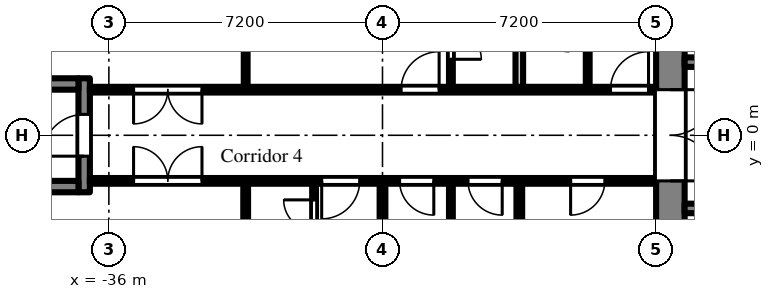
"""IFC4 building model, lengths in metres.
Left out: names, types, materials, properties, quantities, classifications, styles, units other than length and angle.
Written with IfcOpenShell. Run it as: python <this file> out.ifc"""

import sys

from ifc_helpers import new_model, si_unit, direction, frame, frame_2d, origin, place, context, subcontext, project, spatial, rectangle, extrude, element, fill, save


model = new_model("IFC4")
c1 = context("Model", 3, precision=1e-05, world=origin(), true_north=direction((0.0, 1.0)))
c2 = subcontext(c1, "Body", "Model", "MODEL_VIEW")
j1 = project(units=[si_unit("LENGTHUNIT", "METRE"), si_unit("PLANEANGLEUNIT", "RADIAN")], contexts=[c1])
p1 = place(None, origin())
s1 = spatial("IfcSite", under=j1, at=p1, CompositionType="ELEMENT")
p2 = place(p1, origin())
s2 = spatial("IfcBuilding", under=s1, at=p2, CompositionType="ELEMENT")
p3 = place(p2, frame((0.0, 0.0, 69.9)))
s3 = spatial("IfcBuildingStorey", under=s2, at=p3, CompositionType="ELEMENT", Elevation=69.9)
p4 = place(p3, frame((-21.225, -7.2, 0.0), z_axis=(0.0, 0.0, 1.0), x_axis=(0.0, 1.0, 0.0)))
e1 = element("IfcWall", 1, at=p4, inside=s3, PredefinedType="SHEAR", context=c2, shape_type="SweptSolid", body=[
    extrude(rectangle(XDim=14.4, YDim=0.75, at=frame_2d((7.2, 0.0))), origin(), (0.0, 0.0, 1.0), 2.575),
])
p5 = place(p4, frame((6.0, 0.0, 0.0)))
e2 = element("IfcOpeningElement", 2, at=p5, cuts=e1, PredefinedType="OPENING", context=c2, shape_type="SweptSolid", body=[
    extrude(rectangle(XDim=2.4, YDim=2.2, at=frame_2d((1.2, 1.1))), frame((0.0, 0.385, 0.0), z_axis=(0.0, -1.0, 0.0), x_axis=(1.0, 0.0, 0.0)), (0.0, 0.0, 1.0), 0.77),
])
p6 = place(p3, frame((-7.9, 1.925, 0.0), z_axis=(0.0, 0.0, 1.0), x_axis=(-1.0, 0.0, 0.0)))
e3 = element("IfcWall", 3, at=p6, inside=s3, PredefinedType="SHEAR", context=c2, shape_type="SweptSolid", body=[
    extrude(rectangle(XDim=12.95, YDim=0.25, at=frame_2d((6.475, 0.0))), origin(), (0.0, 0.0, 1.0), 2.575),
])
p7 = place(p6, frame((0.525, 0.0, 0.0)))
e4 = element("IfcOpeningElement", 4, at=p7, cuts=e3, PredefinedType="OPENING", context=c2, shape_type="SweptSolid", body=[
    extrude(rectangle(XDim=0.9, YDim=2.1, at=frame_2d((0.45, 1.05))), frame((0.0, 0.135, 0.0), z_axis=(0.0, -1.0, 0.0), x_axis=(1.0, 0.0, 0.0)), (0.0, 0.0, 1.0), 0.27),
])
p8 = place(p6, frame((2.625, 0.0, 0.0)))
e5 = element("IfcOpeningElement", 5, at=p8, cuts=e3, PredefinedType="OPENING", context=c2, shape_type="SweptSolid", body=[
    extrude(rectangle(XDim=1.1, YDim=2.1, at=frame_2d((0.55, 1.05))), frame((0.0, 0.135, 0.0), z_axis=(0.0, -1.0, 0.0), x_axis=(1.0, 0.0, 0.0)), (0.0, 0.0, 1.0), 0.27),
])
p9 = place(p6, frame((7.125, 0.0, 0.0)))
e6 = element("IfcOpeningElement", 6, at=p9, cuts=e3, PredefinedType="OPENING", context=c2, shape_type="SweptSolid", body=[
    extrude(rectangle(XDim=0.9, YDim=2.1, at=frame_2d((0.45, 1.05))), frame((0.0, 0.135, 0.0), z_axis=(0.0, -1.0, 0.0), x_axis=(1.0, 0.0, 0.0)), (0.0, 0.0, 1.0), 0.27),
])
p10 = place(p3, frame((-7.9, -1.925, 0.0), z_axis=(0.0, 0.0, 1.0), x_axis=(-1.0, 0.0, 0.0)))
e7 = element("IfcWall", 7, at=p10, inside=s3, PredefinedType="SHEAR", context=c2, shape_type="SweptSolid", body=[
    extrude(rectangle(XDim=12.95, YDim=0.25, at=frame_2d((6.475, 0.0))), origin(), (0.0, 0.0, 1.0), 2.575),
])
p11 = place(p10, frame((4.825, 0.0, 0.0)))
e8 = element("IfcOpeningElement", 8, at=p11, cuts=e7, PredefinedType="OPENING", context=c2, shape_type="SweptSolid", body=[
    extrude(rectangle(XDim=1.1, YDim=2.1, at=frame_2d((0.55, 1.05))), frame((0.0, 0.135, 0.0), z_axis=(0.0, -1.0, 0.0), x_axis=(1.0, 0.0, 0.0)), (0.0, 0.0, 1.0), 0.27),
])
p12 = place(p10, frame((7.025, 0.0, 0.0)))
e9 = element("IfcOpeningElement", 9, at=p12, cuts=e7, PredefinedType="OPENING", context=c2, shape_type="SweptSolid", body=[
    extrude(rectangle(XDim=1.1, YDim=2.1, at=frame_2d((0.55, 1.05))), frame((0.0, 0.135, 0.0), z_axis=(0.0, -1.0, 0.0), x_axis=(1.0, 0.0, 0.0)), (0.0, 0.0, 1.0), 0.27),
])
p13 = place(p10, frame((9.225, 0.0, 0.0)))
e10 = element("IfcOpeningElement", 10, at=p13, cuts=e7, PredefinedType="OPENING", context=c2, shape_type="SweptSolid", body=[
    extrude(rectangle(XDim=1.1, YDim=2.1, at=frame_2d((0.55, 1.05))), frame((0.0, 0.135, 0.0), z_axis=(0.0, -1.0, 0.0), x_axis=(1.0, 0.0, 0.0)), (0.0, 0.0, 1.0), 0.27),
])
p14 = place(p10, frame((0.525, 0.0, 0.0)))
e11 = element("IfcOpeningElement", 11, at=p14, cuts=e7, PredefinedType="OPENING", context=c2, shape_type="SweptSolid", body=[
    extrude(rectangle(XDim=0.9, YDim=2.1, at=frame_2d((0.45, 1.05))), frame((0.0, 0.135, 0.0), z_axis=(0.0, -1.0, 0.0), x_axis=(1.0, 0.0, 0.0)), (0.0, 0.0, 1.0), 0.27),
])
p15 = place(p10, frame((2.625, 0.0, 0.0)))
e12 = element("IfcOpeningElement", 12, at=p15, cuts=e7, PredefinedType="OPENING", context=c2, shape_type="SweptSolid", body=[
    extrude(rectangle(XDim=1.1, YDim=2.1, at=frame_2d((0.55, 1.05))), frame((0.0, 0.135, 0.0), z_axis=(0.0, -1.0, 0.0), x_axis=(1.0, 0.0, 0.0)), (0.0, 0.0, 1.0), 0.27),
])
p16 = place(p3, frame((-36.65, -1.5, 0.0), z_axis=(0.0, 0.0, 1.0), x_axis=(0.0, 1.0, 0.0)))
e13 = element("IfcWall", 13, at=p16, inside=s3, PredefinedType="SHEAR", context=c2, shape_type="SweptSolid", body=[
    extrude(rectangle(XDim=3.0, YDim=0.3, at=frame_2d((1.5, 0.0))), origin(), (0.0, 0.0, 1.0), 2.575),
])
p17 = place(p16, frame((0.95, 0.0, 0.0)))
e14 = element("IfcOpeningElement", 14, at=p17, cuts=e13, PredefinedType="OPENING", context=c2, shape_type="SweptSolid", body=[
    extrude(rectangle(XDim=1.1, YDim=2.1, at=frame_2d((0.55, 1.05))), frame((0.0, 0.16, 0.0), z_axis=(0.0, -1.0, 0.0), x_axis=(1.0, 0.0, 0.0)), (0.0, 0.0, 1.0), 0.32),
])
for number, where, z_axis, x_axis in (
    (15, (-36.8, -1.35, 0.0), (0.0, 0.0, 1.0), (-1.0, 0.0, 0.0)),
    (16, (-36.8, 1.35, 0.0), (0.0, 0.0, 1.0), (-1.0, 0.0, 0.0)),
):
    element("IfcWall", number, at=place(p3, frame(where, z_axis=z_axis, x_axis=x_axis)), inside=s3, PredefinedType="SHEAR", context=c2, shape_type="SweptSolid", body=[
        extrude(rectangle(XDim=5.8, YDim=0.3, at=frame_2d((2.9, 0.0))), origin(), (0.0, 0.0, 1.0), 2.575),
    ])
p18 = place(p3, frame((-36.5, -1.2, 0.0), z_axis=(0.0, 0.0, 1.0), x_axis=(1.0, 0.0, 0.0)))
e17 = element("IfcWall", 17, at=p18, inside=s3, PredefinedType="PARTITIONING", context=c2, shape_type="SweptSolid", body=[
    extrude(rectangle(XDim=14.9, YDim=0.15, at=frame_2d((7.45, 0.0))), origin(), (0.0, 0.0, 1.0), 2.575),
])
p19 = place(p18, frame((12.65, 0.0, 0.0)))
e18 = element("IfcOpeningElement", 18, at=p19, cuts=e17, PredefinedType="OPENING", context=c2, shape_type="SweptSolid", body=[
    extrude(rectangle(XDim=0.9, YDim=2.1, at=frame_2d((0.45, 1.05))), frame((0.0, 0.085, 0.0), z_axis=(0.0, -1.0, 0.0), x_axis=(1.0, 0.0, 0.0)), (0.0, 0.0, 1.0), 0.17),
])
p20 = place(p18, frame((9.95, 0.0, 0.0)))
e19 = element("IfcOpeningElement", 19, at=p20, cuts=e17, PredefinedType="OPENING", context=c2, shape_type="SweptSolid", body=[
    extrude(rectangle(XDim=0.9, YDim=2.1, at=frame_2d((0.45, 1.05))), frame((0.0, 0.085, 0.0), z_axis=(0.0, -1.0, 0.0), x_axis=(1.0, 0.0, 0.0)), (0.0, 0.0, 1.0), 0.17),
])
p21 = place(p18, frame((8.15, 0.0, 0.0)))
e20 = element("IfcOpeningElement", 20, at=p21, cuts=e17, PredefinedType="OPENING", context=c2, shape_type="SweptSolid", body=[
    extrude(rectangle(XDim=0.9, YDim=2.1, at=frame_2d((0.45, 1.05))), frame((0.0, 0.085, 0.0), z_axis=(0.0, -1.0, 0.0), x_axis=(1.0, 0.0, 0.0)), (0.0, 0.0, 1.0), 0.17),
])
p22 = place(p18, frame((6.1, 0.0, 0.0)))
e21 = element("IfcOpeningElement", 21, at=p22, cuts=e17, PredefinedType="OPENING", context=c2, shape_type="SweptSolid", body=[
    extrude(rectangle(XDim=1.0, YDim=2.1, at=frame_2d((0.5, 1.05))), frame((0.0, 0.085, 0.0), z_axis=(0.0, -1.0, 0.0), x_axis=(1.0, 0.0, 0.0)), (0.0, 0.0, 1.0), 0.17),
])
p23 = place(p18, frame((1.15, 0.0, 0.0)))
e22 = element("IfcOpeningElement", 22, at=p23, cuts=e17, PredefinedType="OPENING", context=c2, shape_type="SweptSolid", body=[
    extrude(rectangle(XDim=1.8, YDim=2.1, at=frame_2d((0.9, 1.05))), frame((0.0, 0.085, 0.0), z_axis=(0.0, -1.0, 0.0), x_axis=(1.0, 0.0, 0.0)), (0.0, 0.0, 1.0), 0.17),
])
p24 = place(p3, frame((-36.5, 1.2, 0.0), z_axis=(0.0, 0.0, 1.0), x_axis=(1.0, 0.0, 0.0)))
e23 = element("IfcWall", 23, at=p24, inside=s3, PredefinedType="PARTITIONING", context=c2, shape_type="SweptSolid", body=[
    extrude(rectangle(XDim=14.9, YDim=0.15, at=frame_2d((7.45, 0.0))), origin(), (0.0, 0.0, 1.0), 2.575),
])
p25 = place(p24, frame((13.7, 0.0, 0.0)))
e24 = element("IfcOpeningElement", 24, at=p25, cuts=e23, PredefinedType="OPENING", context=c2, shape_type="SweptSolid", body=[
    extrude(rectangle(XDim=1.0, YDim=2.1, at=frame_2d((0.5, 1.05))), frame((0.0, 0.085, 0.0), z_axis=(0.0, -1.0, 0.0), x_axis=(1.0, 0.0, 0.0)), (0.0, 0.0, 1.0), 0.17),
])
p26 = place(p24, frame((8.19, 0.0, 0.0)))
e25 = element("IfcOpeningElement", 25, at=p26, cuts=e23, PredefinedType="OPENING", context=c2, shape_type="SweptSolid", body=[
    extrude(rectangle(XDim=1.0, YDim=2.1, at=frame_2d((0.5, 1.05))), frame((0.0, 0.085, 0.0), z_axis=(0.0, -1.0, 0.0), x_axis=(1.0, 0.0, 0.0)), (0.0, 0.0, 1.0), 0.17),
])
p27 = place(p24, frame((1.15, 0.0, 0.0)))
e26 = element("IfcOpeningElement", 26, at=p27, cuts=e23, PredefinedType="OPENING", context=c2, shape_type="SweptSolid", body=[
    extrude(rectangle(XDim=1.8, YDim=2.1, at=frame_2d((0.9, 1.05))), frame((0.0, 0.085, 0.0), z_axis=(0.0, -1.0, 0.0), x_axis=(1.0, 0.0, 0.0)), (0.0, 0.0, 1.0), 0.17),
])
p28 = place(p3, frame((-32.4, -3.0, 0.0), z_axis=(0.0, 0.0, 1.0), x_axis=(0.0, 1.0, 0.0)))
e27 = element("IfcWall", 27, at=p28, inside=s3, PredefinedType="PARTITIONING", context=c2, shape_type="SweptSolid", body=[
    extrude(rectangle(XDim=1.725, YDim=0.125, at=frame_2d((0.863, 0.0))), origin(), (0.0, 0.0, 1.0), 2.575),
])
p29 = place(p3, frame((-32.4, 1.275, 0.0), z_axis=(0.0, 0.0, 1.0), x_axis=(0.0, 1.0, 0.0)))
e28 = element("IfcWall", 28, at=p29, inside=s3, PredefinedType="PARTITIONING", context=c2, shape_type="SweptSolid", body=[
    extrude(rectangle(XDim=5.625, YDim=0.1, at=frame_2d((2.812, 0.0))), origin(), (0.0, 0.0, 1.0), 2.575),
])
p30 = place(p3, frame((-30.6, -2.95, 0.0), z_axis=(0.0, 0.0, 1.0), x_axis=(0.0, 1.0, 0.0)))
e29 = element("IfcWall", 29, at=p30, inside=s3, PredefinedType="PARTITIONING", context=c2, shape_type="SweptSolid", body=[
    extrude(rectangle(XDim=1.675, YDim=0.1, at=frame_2d((0.837, 0.0))), origin(), (0.0, 0.0, 1.0), 2.575),
])
p31 = place(p30, frame((0.45, 0.0, 0.0)))
e30 = element("IfcOpeningElement", 30, at=p31, cuts=e29, PredefinedType="OPENING", context=c2, shape_type="SweptSolid", body=[
    extrude(rectangle(XDim=0.8, YDim=2.1, at=frame_2d((0.4, 1.05))), frame((0.0, 0.06, 0.0), z_axis=(0.0, -1.0, 0.0), x_axis=(1.0, 0.0, 0.0)), (0.0, 0.0, 1.0), 0.12),
])
p32 = place(p3, frame((-28.8, -6.9, 0.0), z_axis=(0.0, 0.0, 1.0), x_axis=(0.0, 1.0, 0.0)))
e31 = element("IfcWall", 31, at=p32, inside=s3, PredefinedType="PARTITIONING", context=c2, shape_type="SweptSolid", body=[
    extrude(rectangle(XDim=5.625, YDim=0.15, at=frame_2d((2.812, 0.0))), origin(), (0.0, 0.0, 1.0), 2.575),
])
p33 = place(p3, frame((-27.0, -6.9, 0.0), z_axis=(0.0, 0.0, 1.0), x_axis=(0.0, 1.0, 0.0)))
e32 = element("IfcWall", 32, at=p33, inside=s3, PredefinedType="PARTITIONING", context=c2, shape_type="SweptSolid", body=[
    extrude(rectangle(XDim=5.625, YDim=0.1, at=frame_2d((2.812, 0.0))), origin(), (0.0, 0.0, 1.0), 2.575),
])
p34 = place(p3, frame((-27.0, 1.275, 0.0), z_axis=(0.0, 0.0, 1.0), x_axis=(0.0, 1.0, 0.0)))
e33 = element("IfcWall", 33, at=p34, inside=s3, PredefinedType="PARTITIONING", context=c2, shape_type="SweptSolid", body=[
    extrude(rectangle(XDim=2.375, YDim=0.1, at=frame_2d((1.188, 0.0))), origin(), (0.0, 0.0, 1.0), 2.575),
])
p35 = place(p34, frame((0.725, 0.0, 0.0)))
e34 = element("IfcOpeningElement", 34, at=p35, cuts=e33, PredefinedType="OPENING", context=c2, shape_type="SweptSolid", body=[
    extrude(rectangle(XDim=0.8, YDim=2.1, at=frame_2d((0.4, 1.05))), frame((0.0, 0.06, 0.0), z_axis=(0.0, -1.0, 0.0), x_axis=(1.0, 0.0, 0.0)), (0.0, 0.0, 1.0), 0.12),
])
p36 = place(p3, frame((-25.2, -6.9, 0.0), z_axis=(0.0, 0.0, 1.0), x_axis=(0.0, 1.0, 0.0)))
e35 = element("IfcWall", 35, at=p36, inside=s3, PredefinedType="PARTITIONING", context=c2, shape_type="SweptSolid", body=[
    extrude(rectangle(XDim=5.625, YDim=0.15, at=frame_2d((2.812, 0.0))), origin(), (0.0, 0.0, 1.0), 2.575),
])
p37 = place(p3, frame((-25.2, 1.275, 0.0), z_axis=(0.0, 0.0, 1.0), x_axis=(0.0, 1.0, 0.0)))
e36 = element("IfcWall", 36, at=p37, inside=s3, PredefinedType="PARTITIONING", context=c2, shape_type="SweptSolid", body=[
    extrude(rectangle(XDim=5.625, YDim=0.2, at=frame_2d((2.812, 0.0))), origin(), (0.0, 0.0, 1.0), 2.575),
])
p38 = place(p3, frame((-23.4, 1.275, 0.0), z_axis=(0.0, 0.0, 1.0), x_axis=(0.0, 1.0, 0.0)))
e37 = element("IfcWall", 37, at=p38, inside=s3, PredefinedType="PARTITIONING", context=c2, shape_type="SweptSolid", body=[
    extrude(rectangle(XDim=1.675, YDim=0.1, at=frame_2d((0.837, 0.0))), origin(), (0.0, 0.0, 1.0), 2.575),
])
p39 = place(p5, frame((2.4, 0.0, 0.0), z_axis=(0.0, 0.0, 1.0), x_axis=(-1.0, 0.0, 0.0)))
e38 = element("IfcDoor", 38, at=p39, inside=s3, OperationType="DOUBLE_DOOR_DOUBLE_SWING", PredefinedType="DOOR", context=c2, shape_type="SweptSolid", body=[
    extrude(rectangle(XDim=2.4, YDim=2.2, at=frame_2d((1.2, 1.1))), frame((0.0, 0.025, 0.0), z_axis=(0.0, -1.0, 0.0), x_axis=(1.0, 0.0, 0.0)), (0.0, 0.0, 1.0), 0.05),
])
fill(e2, e38)
p40 = place(p17, origin())
e39 = element("IfcDoor", 39, at=p40, inside=s3, OperationType="SINGLE_SWING_LEFT", PredefinedType="DOOR", context=c2, shape_type="SweptSolid", body=[
    extrude(rectangle(XDim=1.1, YDim=2.1, at=frame_2d((0.55, 1.05))), frame((0.0, 0.025, 0.0), z_axis=(0.0, -1.0, 0.0), x_axis=(1.0, 0.0, 0.0)), (0.0, 0.0, 1.0), 0.05),
])
fill(e14, e39)
p41 = place(p19, frame((0.9, 0.0, 0.0), z_axis=(0.0, 0.0, 1.0), x_axis=(-1.0, 0.0, 0.0)))
e40 = element("IfcDoor", 40, at=p41, inside=s3, OperationType="SINGLE_SWING_RIGHT", PredefinedType="DOOR", context=c2, shape_type="SweptSolid", body=[
    extrude(rectangle(XDim=0.9, YDim=2.1, at=frame_2d((0.45, 1.05))), frame((0.0, 0.025, 0.0), z_axis=(0.0, -1.0, 0.0), x_axis=(1.0, 0.0, 0.0)), (0.0, 0.0, 1.0), 0.05),
])
fill(e18, e40)
p42 = place(p20, frame((0.9, 0.0, 0.0), z_axis=(0.0, 0.0, 1.0), x_axis=(-1.0, 0.0, 0.0)))
e41 = element("IfcDoor", 41, at=p42, inside=s3, OperationType="SINGLE_SWING_LEFT", PredefinedType="DOOR", context=c2, shape_type="SweptSolid", body=[
    extrude(rectangle(XDim=0.9, YDim=2.1, at=frame_2d((0.45, 1.05))), frame((0.0, 0.025, 0.0), z_axis=(0.0, -1.0, 0.0), x_axis=(1.0, 0.0, 0.0)), (0.0, 0.0, 1.0), 0.05),
])
fill(e19, e41)
p43 = place(p21, frame((0.9, 0.0, 0.0), z_axis=(0.0, 0.0, 1.0), x_axis=(-1.0, 0.0, 0.0)))
e42 = element("IfcDoor", 42, at=p43, inside=s3, OperationType="SINGLE_SWING_LEFT", PredefinedType="DOOR", context=c2, shape_type="SweptSolid", body=[
    extrude(rectangle(XDim=0.9, YDim=2.1, at=frame_2d((0.45, 1.05))), frame((0.0, 0.025, 0.0), z_axis=(0.0, -1.0, 0.0), x_axis=(1.0, 0.0, 0.0)), (0.0, 0.0, 1.0), 0.05),
])
fill(e20, e42)
p44 = place(p31, origin())
e43 = element("IfcDoor", 43, at=p44, inside=s3, OperationType="SINGLE_SWING_RIGHT", PredefinedType="DOOR", context=c2, shape_type="SweptSolid", body=[
    extrude(rectangle(XDim=0.8, YDim=2.1, at=frame_2d((0.4, 1.05))), frame((0.0, 0.025, 0.0), z_axis=(0.0, -1.0, 0.0), x_axis=(1.0, 0.0, 0.0)), (0.0, 0.0, 1.0), 0.05),
])
fill(e30, e43)
p45 = place(p22, frame((1.0, 0.0, 0.0), z_axis=(0.0, 0.0, 1.0), x_axis=(-1.0, 0.0, 0.0)))
e44 = element("IfcDoor", 44, at=p45, inside=s3, OperationType="SINGLE_SWING_RIGHT", PredefinedType="DOOR", context=c2, shape_type="SweptSolid", body=[
    extrude(rectangle(XDim=1.0, YDim=2.1, at=frame_2d((0.5, 1.05))), frame((0.0, 0.025, 0.0), z_axis=(0.0, -1.0, 0.0), x_axis=(1.0, 0.0, 0.0)), (0.0, 0.0, 1.0), 0.05),
])
fill(e21, e44)
p46 = place(p23, origin())
e45 = element("IfcDoor", 45, at=p46, inside=s3, OperationType="DOUBLE_DOOR_DOUBLE_SWING", PredefinedType="DOOR", context=c2, shape_type="SweptSolid", body=[
    extrude(rectangle(XDim=1.8, YDim=2.1, at=frame_2d((0.9, 1.05))), frame((0.0, 0.025, 0.0), z_axis=(0.0, -1.0, 0.0), x_axis=(1.0, 0.0, 0.0)), (0.0, 0.0, 1.0), 0.05),
])
fill(e22, e45)
p47 = place(p25, origin())
e46 = element("IfcDoor", 46, at=p47, inside=s3, OperationType="SINGLE_SWING_RIGHT", PredefinedType="DOOR", context=c2, shape_type="SweptSolid", body=[
    extrude(rectangle(XDim=1.0, YDim=2.1, at=frame_2d((0.5, 1.05))), frame((0.0, 0.025, 0.0), z_axis=(0.0, -1.0, 0.0), x_axis=(1.0, 0.0, 0.0)), (0.0, 0.0, 1.0), 0.05),
])
fill(e24, e46)
p48 = place(p35, frame((0.8, 0.0, 0.0), z_axis=(0.0, 0.0, 1.0), x_axis=(-1.0, 0.0, 0.0)))
e47 = element("IfcDoor", 47, at=p48, inside=s3, OperationType="SINGLE_SWING_RIGHT", PredefinedType="DOOR", context=c2, shape_type="SweptSolid", body=[
    extrude(rectangle(XDim=0.8, YDim=2.1, at=frame_2d((0.4, 1.05))), frame((0.0, 0.025, 0.0), z_axis=(0.0, -1.0, 0.0), x_axis=(1.0, 0.0, 0.0)), (0.0, 0.0, 1.0), 0.05),
])
fill(e34, e47)
p49 = place(p26, origin())
e48 = element("IfcDoor", 48, at=p49, inside=s3, OperationType="SINGLE_SWING_RIGHT", PredefinedType="DOOR", context=c2, shape_type="SweptSolid", body=[
    extrude(rectangle(XDim=1.0, YDim=2.1, at=frame_2d((0.5, 1.05))), frame((0.0, 0.025, 0.0), z_axis=(0.0, -1.0, 0.0), x_axis=(1.0, 0.0, 0.0)), (0.0, 0.0, 1.0), 0.05),
])
fill(e25, e48)
p50 = place(p27, frame((1.8, 0.0, 0.0), z_axis=(0.0, 0.0, 1.0), x_axis=(-1.0, 0.0, 0.0)))
e49 = element("IfcDoor", 49, at=p50, inside=s3, OperationType="DOUBLE_DOOR_DOUBLE_SWING", PredefinedType="DOOR", context=c2, shape_type="SweptSolid", body=[
    extrude(rectangle(XDim=1.8, YDim=2.1, at=frame_2d((0.9, 1.05))), frame((0.0, 0.025, 0.0), z_axis=(0.0, -1.0, 0.0), x_axis=(1.0, 0.0, 0.0)), (0.0, 0.0, 1.0), 0.05),
])
fill(e26, e49)
save(model, sys.argv[1])
